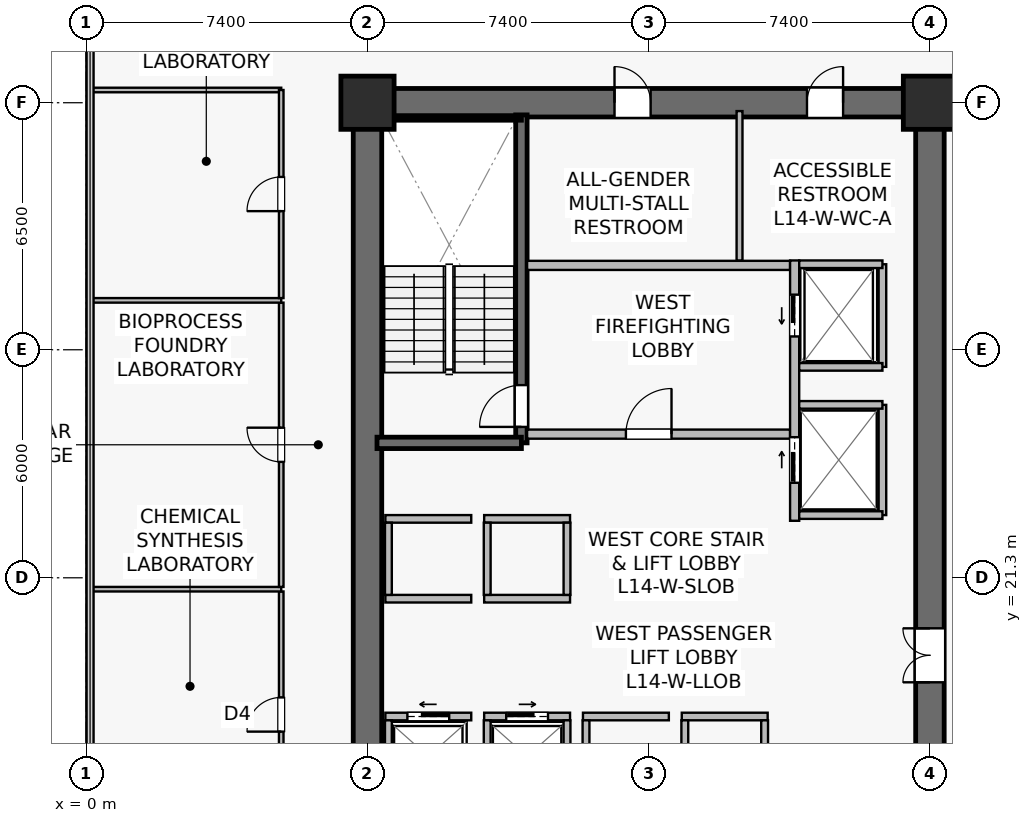
"""IFC4 building model, lengths in metres.
Left out: names, types, materials, properties, quantities, classifications, styles, units other than length and angle.
Written with IfcOpenShell. Run it as: python <this file> out.ifc"""

import sys

from ifc_helpers import new_model, si_unit, direction, frame, frame_2d, origin, origin_2d, place, context, subcontext, project, spatial, rectangle, extrude, source, transform, mapped, element, fill, save


model = new_model("IFC4")
c1 = context("Model", 3, precision=1e-05, world=origin(), true_north=direction((0.0, 1.0)))
c2 = subcontext(c1, "Body", "Model", "MODEL_VIEW")
j1 = project(units=[si_unit("LENGTHUNIT", "METRE"), si_unit("PLANEANGLEUNIT", "RADIAN")], contexts=[c1])
p1 = place(None, origin())
s1 = spatial("IfcSite", under=j1, at=p1, CompositionType="ELEMENT")
p2 = place(p1, origin())
s2 = spatial("IfcBuilding", under=s1, at=p2, CompositionType="ELEMENT")
p3 = place(p2, frame((0.0, 0.0, 58.0)))
s3 = spatial("IfcBuildingStorey", under=s2, at=p3, CompositionType="ELEMENT", Elevation=58.0)
p4 = place(p3, frame((7.025, 33.8, 0.0), z_axis=(0.0, 0.0, 1.0), x_axis=(1.0, 0.0, 0.0)))
e1 = element("IfcWall", 1, at=p4, inside=s3, PredefinedType="SHEAR", context=c2, shape_type="SweptSolid", body=[
    extrude(rectangle(XDim=15.55, YDim=0.75, at=frame_2d((7.775, 0.0))), origin(), (0.0, 0.0, 1.0), 3.78),
])
p5 = place(p4, frame((6.875, 0.0, 0.0)))
e2 = element("IfcOpeningElement", 2, at=p5, cuts=e1, PredefinedType="OPENING", context=c2, shape_type="SweptSolid", body=[
    extrude(rectangle(XDim=0.95, YDim=2.15, at=frame_2d((0.475, 1.075))), frame((0.0, 0.385, 0.0), z_axis=(0.0, -1.0, 0.0), x_axis=(1.0, 0.0, 0.0)), (0.0, 0.0, 1.0), 0.77),
])
p6 = place(p4, frame((11.94, 0.0, 0.0)))
e3 = element("IfcOpeningElement", 3, at=p6, cuts=e1, PredefinedType="OPENING", context=c2, shape_type="SweptSolid", body=[
    extrude(rectangle(XDim=0.95, YDim=2.15, at=frame_2d((0.475, 1.075))), frame((0.0, 0.385, 0.0), z_axis=(0.0, -1.0, 0.0), x_axis=(1.0, 0.0, 0.0)), (0.0, 0.0, 1.0), 0.77),
])
p7 = place(p3, frame((7.4, 15.175, 0.0), z_axis=(0.0, 0.0, 1.0), x_axis=(0.0, 1.0, 0.0)))
e4 = element("IfcWall", 4, at=p7, inside=s3, PredefinedType="SHEAR", context=c2, shape_type="SweptSolid", body=[
    extrude(rectangle(XDim=18.25, YDim=0.75, at=frame_2d((9.125, 0.0))), origin(), (0.0, 0.0, 1.0), 3.78),
])
p8 = place(p3, frame((22.2, 15.175, 0.0), z_axis=(0.0, 0.0, 1.0), x_axis=(0.0, 1.0, 0.0)))
e5 = element("IfcWall", 5, at=p8, inside=s3, PredefinedType="SHEAR", context=c2, shape_type="SweptSolid", body=[
    extrude(rectangle(XDim=18.25, YDim=0.75, at=frame_2d((9.125, 0.0))), origin(), (0.0, 0.0, 1.0), 3.78),
])
p9 = place(p8, frame((3.375, 0.0, 0.0)))
e6 = element("IfcOpeningElement", 6, at=p9, cuts=e5, PredefinedType="OPENING", context=c2, shape_type="SweptSolid", body=[
    extrude(rectangle(XDim=1.42, YDim=2.2, at=frame_2d((0.71, 1.1))), frame((0.0, 0.385, 0.0), z_axis=(0.0, -1.0, 0.0), x_axis=(1.0, 0.0, 0.0)), (0.0, 0.0, 1.0), 0.77),
])
p10 = place(p3, frame((11.45, 24.85, 0.0), z_axis=(0.0, 0.0, 1.0), x_axis=(0.0, 1.0, 0.0)))
e7 = element("IfcWall", 7, at=p10, inside=s3, PredefinedType="SHEAR", context=c2, shape_type="SweptSolid", body=[
    extrude(rectangle(XDim=8.63, YDim=0.3, at=frame_2d((4.315, 0.0))), origin(), (0.0, 0.0, 1.0), 3.78),
])
p11 = place(p10, frame((0.42, 0.0, 0.0)))
e8 = element("IfcOpeningElement", 8, at=p11, cuts=e7, PredefinedType="OPENING", context=c2, shape_type="SweptSolid", body=[
    extrude(rectangle(XDim=1.1, YDim=2.15, at=frame_2d((0.55, 1.075))), frame((0.0, 0.16, 0.0), z_axis=(0.0, -1.0, 0.0), x_axis=(1.0, 0.0, 0.0)), (0.0, 0.0, 1.0), 0.32),
])
p12 = place(p3, frame((7.65, 24.85, 0.0), z_axis=(0.0, 0.0, 1.0), x_axis=(1.0, 0.0, 0.0)))
e9 = element("IfcWall", 9, at=p12, inside=s3, PredefinedType="SHEAR", context=c2, shape_type="SweptSolid", body=[
    extrude(rectangle(XDim=3.8, YDim=0.3, at=frame_2d((1.9, 0.0))), origin(), (0.0, 0.0, 1.0), 3.78),
])
p13 = place(p3, frame((7.73, 33.4, 0.0), z_axis=(0.0, 0.0, 1.0), x_axis=(1.0, 0.0, 0.0)))
e10 = element("IfcWall", 10, at=p13, inside=s3, PredefinedType="SOLIDWALL", context=c2, shape_type="SweptSolid", body=[
    extrude(rectangle(XDim=3.72, YDim=0.12, at=frame_2d((1.86, 0.0))), origin(), (0.0, 0.0, 1.0), 3.78),
])
m1 = source(origin(), c2, "Body", "SweptSolid", [
    extrude(rectangle(XDim=1.4, YDim=1.4, at=origin_2d()), origin(), (0.0, 0.0, 1.0), 4.1),
])
for number, where, z_axis, x_axis in (
    (11, (7.4, 33.8, 0.0), (0.0, 0.0, 1.0), (1.0, 0.0, 0.0)),
    (12, (22.2, 33.8, 0.0), (0.0, 0.0, 1.0), (1.0, 0.0, 0.0)),
):
    element("IfcColumn", number, at=place(p3, frame(where, z_axis=z_axis, x_axis=x_axis)), inside=s3, PredefinedType="COLUMN", context=c2, shape_type="MappedRepresentation", body=[
        mapped(m1, transform((0.0, 0.0, 0.0), scale=1.0)),
    ])
p14 = place(p3, frame((11.6, 25.08, 0.0), z_axis=(0.0, 0.0, 1.0), x_axis=(1.0, 0.0, 0.0)))
e13 = element("IfcWall", 13, at=p14, inside=s3, PredefinedType="SOLIDWALL", context=c2, shape_type="SweptSolid", body=[
    extrude(rectangle(XDim=6.92, YDim=0.24, at=frame_2d((3.46, 0.0))), origin(), (0.0, 0.0, 1.0), 3.065),
])
p15 = place(p14, frame((2.6, 0.0, 0.0)))
e14 = element("IfcOpeningElement", 14, at=p15, cuts=e13, PredefinedType="OPENING", context=c2, shape_type="SweptSolid", body=[
    extrude(rectangle(XDim=1.2, YDim=2.16, at=frame_2d((0.6, 1.08))), frame((0.0, 0.13, 0.0), z_axis=(0.0, -1.0, 0.0), x_axis=(1.0, 0.0, 0.0)), (0.0, 0.0, 1.0), 0.26),
])
p16 = place(p3, frame((11.6, 29.52, 0.0), z_axis=(0.0, 0.0, 1.0), x_axis=(1.0, 0.0, 0.0)))
e15 = element("IfcWall", 15, at=p16, inside=s3, PredefinedType="SOLIDWALL", context=c2, shape_type="SweptSolid", body=[
    extrude(rectangle(XDim=6.92, YDim=0.24, at=frame_2d((3.46, 0.0))), origin(), (0.0, 0.0, 1.0), 3.065),
])
p17 = place(p3, frame((18.64, 22.8, 0.0), z_axis=(0.0, 0.0, 1.0), x_axis=(0.0, 1.0, 0.0)))
e16 = element("IfcWall", 16, at=p17, inside=s3, PredefinedType="SOLIDWALL", context=c2, shape_type="SweptSolid", body=[
    extrude(rectangle(XDim=6.85, YDim=0.24, at=frame_2d((3.425, 0.0))), origin(), (0.0, 0.0, 1.0), 2.865),
])
p18 = place(p17, frame((4.85, 0.0, 0.0)))
e17 = element("IfcOpeningElement", 17, at=p18, cuts=e16, PredefinedType="OPENING", context=c2, shape_type="SweptSolid", body=[
    extrude(rectangle(XDim=1.1, YDim=2.22, at=frame_2d((0.55, 1.11))), frame((0.0, 0.13, 0.0), z_axis=(0.0, -1.0, 0.0), x_axis=(1.0, 0.0, 0.0)), (0.0, 0.0, 1.0), 0.26),
])
p19 = place(p17, frame((1.0, 0.0, 0.0)))
e18 = element("IfcOpeningElement", 18, at=p19, cuts=e16, PredefinedType="OPENING", context=c2, shape_type="SweptSolid", body=[
    extrude(rectangle(XDim=1.2, YDim=2.22, at=frame_2d((0.6, 1.11))), frame((0.0, 0.13, 0.0), z_axis=(0.0, -1.0, 0.0), x_axis=(1.0, 0.0, 0.0)), (0.0, 0.0, 1.0), 0.26),
])
p20 = place(p3, frame((7.87, 17.65, 0.0), z_axis=(0.0, 0.0, 1.0), x_axis=(1.0, 0.0, 0.0)))
e19 = element("IfcWall", 19, at=p20, inside=s3, PredefinedType="SOLIDWALL", context=c2, shape_type="SweptSolid", body=[
    extrude(rectangle(XDim=2.26, YDim=0.2, at=frame_2d((1.13, 0.0))), origin(), (0.0, 0.0, 1.0), 3.78),
])
p21 = place(p20, frame((0.58, 0.0, 0.0)))
e20 = element("IfcOpeningElement", 20, at=p21, cuts=e19, PredefinedType="OPENING", context=c2, shape_type="SweptSolid", body=[
    extrude(rectangle(XDim=1.1, YDim=2.22, at=frame_2d((0.55, 1.11))), frame((0.0, 0.11, 0.0), z_axis=(0.0, -1.0, 0.0), x_axis=(1.0, 0.0, 0.0)), (0.0, 0.0, 1.0), 0.22),
])
p22 = place(p3, frame((7.95, 15.65, 0.0), z_axis=(0.0, 0.0, 1.0), x_axis=(0.0, 1.0, 0.0)))
e21 = element("IfcWall", 21, at=p22, inside=s3, PredefinedType="SOLIDWALL", context=c2, shape_type="SweptSolid", body=[
    extrude(rectangle(XDim=1.9, YDim=0.18, at=frame_2d((0.95, 0.0))), origin(), (0.0, 0.0, 1.0), 3.78),
])
p23 = place(p3, frame((10.47, 17.65, 0.0), z_axis=(0.0, 0.0, 1.0), x_axis=(1.0, 0.0, 0.0)))
e22 = element("IfcWall", 22, at=p23, inside=s3, PredefinedType="SOLIDWALL", context=c2, shape_type="SweptSolid", body=[
    extrude(rectangle(XDim=2.26, YDim=0.2, at=frame_2d((1.13, 0.0))), origin(), (0.0, 0.0, 1.0), 3.78),
])
p24 = place(p23, frame((0.58, 0.0, 0.0)))
e23 = element("IfcOpeningElement", 23, at=p24, cuts=e22, PredefinedType="OPENING", context=c2, shape_type="SweptSolid", body=[
    extrude(rectangle(XDim=1.1, YDim=2.22, at=frame_2d((0.55, 1.11))), frame((0.0, 0.11, 0.0), z_axis=(0.0, -1.0, 0.0), x_axis=(1.0, 0.0, 0.0)), (0.0, 0.0, 1.0), 0.22),
])
for number, where, z_axis, x_axis in (
    (24, (10.55, 15.65, 0.0), (0.0, 0.0, 1.0), (0.0, 1.0, 0.0)),
    (25, (12.65, 15.65, 0.0), (0.0, 0.0, 1.0), (0.0, 1.0, 0.0)),
):
    element("IfcWall", number, at=place(p3, frame(where, z_axis=z_axis, x_axis=x_axis)), inside=s3, PredefinedType="SOLIDWALL", context=c2, shape_type="SweptSolid", body=[
        extrude(rectangle(XDim=1.9, YDim=0.18, at=frame_2d((0.95, 0.0))), origin(), (0.0, 0.0, 1.0), 3.78),
    ])
p25 = place(p3, frame((13.07, 17.65, 0.0), z_axis=(0.0, 0.0, 1.0), x_axis=(1.0, 0.0, 0.0)))
e26 = element("IfcWall", 26, at=p25, inside=s3, PredefinedType="SOLIDWALL", context=c2, shape_type="SweptSolid", body=[
    extrude(rectangle(XDim=2.26, YDim=0.2, at=frame_2d((1.13, 0.0))), origin(), (0.0, 0.0, 1.0), 3.065),
])
p26 = place(p3, frame((13.15, 15.65, 0.0), z_axis=(0.0, 0.0, 1.0), x_axis=(0.0, 1.0, 0.0)))
e27 = element("IfcWall", 27, at=p26, inside=s3, PredefinedType="SOLIDWALL", context=c2, shape_type="SweptSolid", body=[
    extrude(rectangle(XDim=1.9, YDim=0.18, at=frame_2d((0.95, 0.0))), origin(), (0.0, 0.0, 1.0), 3.78),
])
p27 = place(p3, frame((15.67, 17.65, 0.0), z_axis=(0.0, 0.0, 1.0), x_axis=(1.0, 0.0, 0.0)))
e28 = element("IfcWall", 28, at=p27, inside=s3, PredefinedType="SOLIDWALL", context=c2, shape_type="SweptSolid", body=[
    extrude(rectangle(XDim=2.26, YDim=0.2, at=frame_2d((1.13, 0.0))), origin(), (0.0, 0.0, 1.0), 3.78),
])
for number, where, z_axis, x_axis in (
    (29, (15.75, 15.65, 0.0), (0.0, 0.0, 1.0), (0.0, 1.0, 0.0)),
    (30, (17.85, 15.65, 0.0), (0.0, 0.0, 1.0), (0.0, 1.0, 0.0)),
):
    element("IfcWall", number, at=place(p3, frame(where, z_axis=z_axis, x_axis=x_axis)), inside=s3, PredefinedType="SOLIDWALL", context=c2, shape_type="SweptSolid", body=[
        extrude(rectangle(XDim=1.9, YDim=0.18, at=frame_2d((0.95, 0.0))), origin(), (0.0, 0.0, 1.0), 3.78),
    ])
for number, where, z_axis, x_axis in (
    (31, (7.87, 20.75, 0.0), (0.0, 0.0, 1.0), (1.0, 0.0, 0.0)),
    (32, (7.87, 22.85, 0.0), (0.0, 0.0, 1.0), (1.0, 0.0, 0.0)),
):
    element("IfcWall", number, at=place(p3, frame(where, z_axis=z_axis, x_axis=x_axis)), inside=s3, PredefinedType="SOLIDWALL", context=c2, shape_type="SweptSolid", body=[
        extrude(rectangle(XDim=2.26, YDim=0.2, at=frame_2d((1.13, 0.0))), origin(), (0.0, 0.0, 1.0), 3.78),
    ])
p28 = place(p3, frame((7.95, 20.85, 0.0), z_axis=(0.0, 0.0, 1.0), x_axis=(0.0, 1.0, 0.0)))
e33 = element("IfcWall", 33, at=p28, inside=s3, PredefinedType="SOLIDWALL", context=c2, shape_type="SweptSolid", body=[
    extrude(rectangle(XDim=1.9, YDim=0.18, at=frame_2d((0.95, 0.0))), origin(), (0.0, 0.0, 1.0), 3.78),
])
for number, where, z_axis, x_axis in (
    (34, (10.47, 20.75, 0.0), (0.0, 0.0, 1.0), (1.0, 0.0, 0.0)),
    (35, (10.47, 22.85, 0.0), (0.0, 0.0, 1.0), (1.0, 0.0, 0.0)),
):
    element("IfcWall", number, at=place(p3, frame(where, z_axis=z_axis, x_axis=x_axis)), inside=s3, PredefinedType="SOLIDWALL", context=c2, shape_type="SweptSolid", body=[
        extrude(rectangle(XDim=2.26, YDim=0.2, at=frame_2d((1.13, 0.0))), origin(), (0.0, 0.0, 1.0), 3.78),
    ])
for number, where, z_axis, x_axis in (
    (36, (10.55, 20.85, 0.0), (0.0, 0.0, 1.0), (0.0, 1.0, 0.0)),
    (37, (12.65, 20.85, 0.0), (0.0, 0.0, 1.0), (0.0, 1.0, 0.0)),
):
    element("IfcWall", number, at=place(p3, frame(where, z_axis=z_axis, x_axis=x_axis)), inside=s3, PredefinedType="SOLIDWALL", context=c2, shape_type="SweptSolid", body=[
        extrude(rectangle(XDim=1.9, YDim=0.18, at=frame_2d((0.95, 0.0))), origin(), (0.0, 0.0, 1.0), 3.78),
    ])
p29 = place(p3, frame((20.95, 26.85, 0.0), z_axis=(0.0, 0.0, 1.0), x_axis=(0.0, 1.0, 0.0)))
e38 = element("IfcWall", 38, at=p29, inside=s3, PredefinedType="SOLIDWALL", context=c2, shape_type="SweptSolid", body=[
    extrude(rectangle(XDim=2.7, YDim=0.2, at=frame_2d((1.35, 0.0))), origin(), (0.0, 0.0, 1.0), 3.78),
])
p30 = place(p3, frame((18.76, 29.55, 0.0), z_axis=(0.0, 0.0, 1.0), x_axis=(1.0, 0.0, 0.0)))
e39 = element("IfcWall", 39, at=p30, inside=s3, PredefinedType="SOLIDWALL", context=c2, shape_type="SweptSolid", body=[
    extrude(rectangle(XDim=2.19, YDim=0.2, at=frame_2d((1.095, 0.0))), origin(), (0.0, 0.0, 1.0), 3.78),
])
p31 = place(p3, frame((18.76, 26.85, 0.0), z_axis=(0.0, 0.0, 1.0), x_axis=(1.0, 0.0, 0.0)))
e40 = element("IfcWall", 40, at=p31, inside=s3, PredefinedType="SOLIDWALL", context=c2, shape_type="SweptSolid", body=[
    extrude(rectangle(XDim=2.19, YDim=0.2, at=frame_2d((1.095, 0.0))), origin(), (0.0, 0.0, 1.0), 3.177),
])
p32 = place(p3, frame((20.95, 22.95, 0.0), z_axis=(0.0, 0.0, 1.0), x_axis=(0.0, 1.0, 0.0)))
e41 = element("IfcWall", 41, at=p32, inside=s3, PredefinedType="SOLIDWALL", context=c2, shape_type="SweptSolid", body=[
    extrude(rectangle(XDim=2.9, YDim=0.2, at=frame_2d((1.45, 0.0))), origin(), (0.0, 0.0, 1.0), 2.865),
])
for number, where, z_axis, x_axis in (
    (42, (18.76, 25.85, 0.0), (0.0, 0.0, 1.0), (1.0, 0.0, 0.0)),
    (43, (18.76, 22.95, 0.0), (0.0, 0.0, 1.0), (1.0, 0.0, 0.0)),
):
    element("IfcWall", number, at=place(p3, frame(where, z_axis=z_axis, x_axis=x_axis)), inside=s3, PredefinedType="SOLIDWALL", context=c2, shape_type="SweptSolid", body=[
        extrude(rectangle(XDim=2.19, YDim=0.2, at=frame_2d((1.095, 0.0))), origin(), (0.0, 0.0, 1.0), 3.78),
    ])
p33 = place(p3, frame((17.19, 29.65, 0.0), z_axis=(0.0, 0.0, 1.0), x_axis=(0.0, 1.0, 0.0)))
e44 = element("IfcWall", 44, at=p33, inside=s3, PredefinedType="PLUMBINGWALL", context=c2, shape_type="SweptSolid", body=[
    extrude(rectangle(XDim=3.93, YDim=0.155, at=frame_2d((1.965, 0.0))), origin(), (0.0, 0.0, 1.0), 3.78),
])
p34 = place(p3, frame((0.11, 34.135, 0.0), z_axis=(0.0, 0.0, 1.0), x_axis=(1.0, 0.0, 0.0)))
e45 = element("IfcWall", 45, at=p34, inside=s3, PredefinedType="PARTITIONING", context=c2, shape_type="SweptSolid", body=[
    extrude(rectangle(XDim=5.02, YDim=0.12, at=frame_2d((2.51, 0.0))), origin(), (0.0, 0.0, 1.0), 3.78),
])
p35 = place(p3, frame((5.13, 14.465, 0.0), z_axis=(0.0, 0.0, 1.0), x_axis=(0.0, 1.0, 0.0)))
e46 = element("IfcWall", 46, at=p35, inside=s3, PredefinedType="PARTITIONING", context=c2, shape_type="SweptSolid", body=[
    extrude(rectangle(XDim=6.475, YDim=0.12, at=frame_2d((3.237, 0.0))), origin(), (0.0, 0.0, 1.0), 3.78),
])
p36 = place(p35, frame((2.788, 0.0, 0.0)))
e47 = element("IfcOpeningElement", 47, at=p36, cuts=e46, PredefinedType="OPENING", context=c2, shape_type="SweptSolid", body=[
    extrude(rectangle(XDim=0.9, YDim=2.1, at=frame_2d((0.45, 1.05))), frame((0.0, 0.07, 0.0), z_axis=(0.0, -1.0, 0.0), x_axis=(1.0, 0.0, 0.0)), (0.0, 0.0, 1.0), 0.14),
])
p37 = place(p3, frame((0.11, 21.0, 0.0), z_axis=(0.0, 0.0, 1.0), x_axis=(1.0, 0.0, 0.0)))
e48 = element("IfcWall", 48, at=p37, inside=s3, PredefinedType="PARTITIONING", context=c2, shape_type="SweptSolid", body=[
    extrude(rectangle(XDim=5.02, YDim=0.12, at=frame_2d((2.51, 0.0))), origin(), (0.0, 0.0, 1.0), 3.78),
])
p38 = place(p3, frame((5.13, 21.06, 0.0), z_axis=(0.0, 0.0, 1.0), x_axis=(0.0, 1.0, 0.0)))
e49 = element("IfcWall", 49, at=p38, inside=s3, PredefinedType="PARTITIONING", context=c2, shape_type="SweptSolid", body=[
    extrude(rectangle(XDim=7.48, YDim=0.12, at=frame_2d((3.74, 0.0))), origin(), (0.0, 0.0, 1.0), 3.78),
])
p39 = place(p38, frame((3.29, 0.0, 0.0)))
e50 = element("IfcOpeningElement", 50, at=p39, cuts=e49, PredefinedType="OPENING", context=c2, shape_type="SweptSolid", body=[
    extrude(rectangle(XDim=0.9, YDim=2.1, at=frame_2d((0.45, 1.05))), frame((0.0, 0.07, 0.0), z_axis=(0.0, -1.0, 0.0), x_axis=(1.0, 0.0, 0.0)), (0.0, 0.0, 1.0), 0.14),
])
p40 = place(p3, frame((0.11, 28.6, 0.0), z_axis=(0.0, 0.0, 1.0), x_axis=(1.0, 0.0, 0.0)))
e51 = element("IfcWall", 51, at=p40, inside=s3, PredefinedType="PARTITIONING", context=c2, shape_type="SweptSolid", body=[
    extrude(rectangle(XDim=5.02, YDim=0.12, at=frame_2d((2.51, 0.0))), origin(), (0.0, 0.0, 1.0), 3.78),
])
p41 = place(p3, frame((5.13, 28.66, 0.0), z_axis=(0.0, 0.0, 1.0), x_axis=(0.0, 1.0, 0.0)))
e52 = element("IfcWall", 52, at=p41, inside=s3, PredefinedType="PARTITIONING", context=c2, shape_type="SweptSolid", body=[
    extrude(rectangle(XDim=5.475, YDim=0.12, at=frame_2d((2.738, 0.0))), origin(), (0.0, 0.0, 1.0), 3.78),
])
p42 = place(p41, frame((2.288, 0.0, 0.0)))
e53 = element("IfcOpeningElement", 53, at=p42, cuts=e52, PredefinedType="OPENING", context=c2, shape_type="SweptSolid", body=[
    extrude(rectangle(XDim=0.9, YDim=2.1, at=frame_2d((0.45, 1.05))), frame((0.0, 0.07, 0.0), z_axis=(0.0, -1.0, 0.0), x_axis=(1.0, 0.0, 0.0)), (0.0, 0.0, 1.0), 0.14),
])
m2 = source(origin(), c2, "Body", "SweptSolid", [
    extrude(rectangle(XDim=1.1, YDim=2.15, at=frame_2d((0.55, 1.075))), frame((0.0, 0.025, 0.0), z_axis=(0.0, -1.0, 0.0), x_axis=(1.0, 0.0, 0.0)), (0.0, 0.0, 1.0), 0.05),
])
p43 = place(p11, origin())
e54 = element("IfcDoor", 54, at=p43, inside=s3, OperationType="SINGLE_SWING_LEFT", PredefinedType="DOOR", context=c2, shape_type="MappedRepresentation", body=[
    mapped(m2, transform((0.0, 0.0, 0.0), scale=1.0)),
])
fill(e8, e54)
m3 = source(origin(), c2, "Body", "SweptSolid", [
    extrude(rectangle(XDim=1.2, YDim=2.16, at=frame_2d((0.6, 1.08))), frame((0.0, 0.025, 0.0), z_axis=(0.0, -1.0, 0.0), x_axis=(1.0, 0.0, 0.0)), (0.0, 0.0, 1.0), 0.05),
])
p44 = place(p15, origin())
e55 = element("IfcDoor", 55, at=p44, inside=s3, OperationType="SINGLE_SWING_RIGHT", PredefinedType="DOOR", context=c2, shape_type="MappedRepresentation", body=[
    mapped(m3, transform((0.0, 0.0, 0.0), scale=1.0)),
])
fill(e14, e55)
m4 = source(origin(), c2, "Body", "SweptSolid", [
    extrude(rectangle(XDim=1.1, YDim=2.22, at=frame_2d((0.55, 1.11))), frame((0.0, 0.025, 0.0), z_axis=(0.0, -1.0, 0.0), x_axis=(1.0, 0.0, 0.0)), (0.0, 0.0, 1.0), 0.05),
])
p45 = place(p21, origin())
e56 = element("IfcDoor", 56, at=p45, inside=s3, OperationType="SLIDING_TO_LEFT", PredefinedType="USERDEFINED", context=c2, shape_type="MappedRepresentation", body=[
    mapped(m4, transform((0.0, 0.0, 0.0), scale=1.0)),
])
fill(e20, e56)
p46 = place(p24, origin())
e57 = element("IfcDoor", 57, at=p46, inside=s3, OperationType="SLIDING_TO_RIGHT", PredefinedType="USERDEFINED", context=c2, shape_type="MappedRepresentation", body=[
    mapped(m4, transform((0.0, 0.0, 0.0), scale=1.0)),
])
fill(e23, e57)
p47 = place(p18, origin())
e58 = element("IfcDoor", 58, at=p47, inside=s3, OperationType="SLIDING_TO_LEFT", PredefinedType="USERDEFINED", context=c2, shape_type="MappedRepresentation", body=[
    mapped(m4, transform((0.0, 0.0, 0.0), scale=1.0)),
])
fill(e17, e58)
m5 = source(origin(), c2, "Body", "SweptSolid", [
    extrude(rectangle(XDim=1.2, YDim=2.22, at=frame_2d((0.6, 1.11))), frame((0.0, 0.025, 0.0), z_axis=(0.0, -1.0, 0.0), x_axis=(1.0, 0.0, 0.0)), (0.0, 0.0, 1.0), 0.05),
])
p48 = place(p19, origin())
e59 = element("IfcDoor", 59, at=p48, inside=s3, OperationType="SLIDING_TO_RIGHT", PredefinedType="USERDEFINED", context=c2, shape_type="MappedRepresentation", body=[
    mapped(m5, transform((0.0, 0.0, 0.0), scale=1.0)),
])
fill(e18, e59)
m6 = source(origin(), c2, "Body", "SweptSolid", [
    extrude(rectangle(XDim=1.42, YDim=2.2, at=frame_2d((0.71, 1.1))), frame((0.0, 0.025, 0.0), z_axis=(0.0, -1.0, 0.0), x_axis=(1.0, 0.0, 0.0)), (0.0, 0.0, 1.0), 0.05),
])
p49 = place(p9, origin())
e60 = element("IfcDoor", 60, at=p49, inside=s3, OperationType="DOUBLE_DOOR_SINGLE_SWING", PredefinedType="DOOR", context=c2, shape_type="MappedRepresentation", body=[
    mapped(m6, transform((0.0, 0.0, 0.0), scale=1.0)),
])
fill(e6, e60)
m7 = source(origin(), c2, "Body", "SweptSolid", [
    extrude(rectangle(XDim=0.95, YDim=2.15, at=frame_2d((0.475, 1.075))), frame((0.0, 0.025, 0.0), z_axis=(0.0, -1.0, 0.0), x_axis=(1.0, 0.0, 0.0)), (0.0, 0.0, 1.0), 0.05),
])
p50 = place(p5, origin())
e61 = element("IfcDoor", 61, at=p50, inside=s3, OperationType="SINGLE_SWING_LEFT", PredefinedType="DOOR", context=c2, shape_type="MappedRepresentation", body=[
    mapped(m7, transform((0.0, 0.0, 0.0), scale=1.0)),
])
fill(e2, e61)
p51 = place(p6, origin())
e62 = element("IfcDoor", 62, at=p51, inside=s3, OperationType="SINGLE_SWING_RIGHT", PredefinedType="DOOR", context=c2, shape_type="MappedRepresentation", body=[
    mapped(m7, transform((0.0, 0.0, 0.0), scale=1.0)),
])
fill(e3, e62)
m8 = source(origin(), c2, "Body", "SweptSolid", [
    extrude(rectangle(XDim=0.9, YDim=2.1, at=frame_2d((0.45, 1.05))), frame((0.0, 0.025, 0.0), z_axis=(0.0, -1.0, 0.0), x_axis=(1.0, 0.0, 0.0)), (0.0, 0.0, 1.0), 0.05),
])
p52 = place(p36, origin())
e63 = element("IfcDoor", 63, at=p52, inside=s3, OperationType="SINGLE_SWING_LEFT", PredefinedType="DOOR", context=c2, shape_type="MappedRepresentation", body=[
    mapped(m8, transform((0.0, 0.0, 0.0), scale=1.0)),
])
fill(e47, e63)
p53 = place(p39, origin())
e64 = element("IfcDoor", 64, at=p53, inside=s3, OperationType="SINGLE_SWING_RIGHT", PredefinedType="DOOR", context=c2, shape_type="MappedRepresentation", body=[
    mapped(m8, transform((0.0, 0.0, 0.0), scale=1.0)),
])
fill(e50, e64)
p54 = place(p42, origin())
e65 = element("IfcDoor", 65, at=p54, inside=s3, OperationType="SINGLE_SWING_LEFT", PredefinedType="DOOR", context=c2, shape_type="MappedRepresentation", body=[
    mapped(m8, transform((0.0, 0.0, 0.0), scale=1.0)),
])
fill(e53, e65)
save(model, sys.argv[1])
